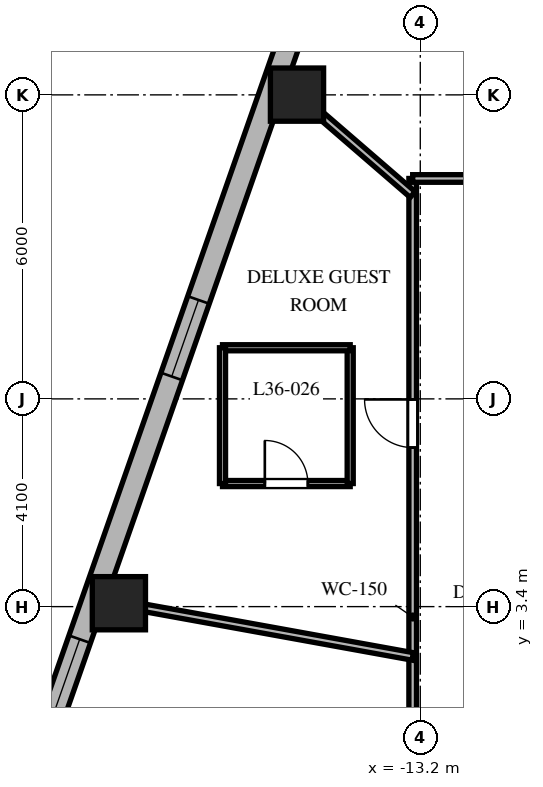
"""IFC4 building model, lengths in metres.
Left out: names, types, materials, properties, quantities, classifications, styles, units other than length and angle.
Written with IfcOpenShell. Run it as: python <this file> out.ifc"""

import sys

from ifc_helpers import new_model, si_unit, direction, frame, frame_2d, origin, origin_2d, place, context, subcontext, project, spatial, rectangle, extrude, element, fill, save


model = new_model("IFC4")
c1 = context("Model", 3, precision=1e-05, world=origin(), true_north=direction((0.0, 1.0)))
c2 = subcontext(c1, "Body", "Model", "MODEL_VIEW")
j1 = project(units=[si_unit("LENGTHUNIT", "METRE"), si_unit("PLANEANGLEUNIT", "RADIAN")], contexts=[c1])
p1 = place(None, origin())
s1 = spatial("IfcSite", under=j1, at=p1, CompositionType="ELEMENT")
p2 = place(p1, origin())
s2 = spatial("IfcBuilding", under=s1, at=p2, CompositionType="ELEMENT")
p3 = place(p2, frame((0.0, 0.0, 148.0)))
s3 = spatial("IfcBuildingStorey", under=s2, at=p3, CompositionType="ELEMENT", Elevation=148.0)
for number, where, z_axis, x_axis in (
    (1, (-15.633, 13.505, 0.0), (0.0, 0.0, 1.0), (1.0, 0.0, 0.0)),
    (2, (-19.148, 3.467, 0.0), (0.0, 0.0, 1.0), (1.0, 0.0, 0.0)),
):
    element("IfcColumn", number, at=place(p3, frame(where, z_axis=z_axis, x_axis=x_axis)), inside=s3, PredefinedType="COLUMN", context=c2, shape_type="SweptSolid", body=[
        extrude(rectangle(XDim=1.05, YDim=1.05, at=origin_2d()), origin(), (0.0, 0.0, 1.0), 3.7),
    ])
p4 = place(p3, frame((-14.937, 16.993, 0.0), z_axis=(0.0, 0.0, 1.0), x_axis=(-0.330431575061, -0.943829949834, 0.0)))
e3 = element("IfcWall", 3, at=p4, inside=s3, PredefinedType="SOLIDWALL", context=c2, shape_type="SweptSolid", body=[
    extrude(rectangle(XDim=17.689, YDim=0.45, at=frame_2d((8.844, 0.0))), origin(), (0.0, 0.0, 1.0), 3.4),
])
p5 = place(p4, frame((0.95, 0.0, 0.8)))
e4 = element("IfcOpeningElement", 4, at=p5, cuts=e3, PredefinedType="OPENING", context=c2, shape_type="SweptSolid", body=[
    extrude(rectangle(XDim=1.6, YDim=1.75, at=frame_2d((0.8, 0.875))), frame((0.0, 0.235, 0.0), z_axis=(0.0, -1.0, 0.0), x_axis=(1.0, 0.0, 0.0)), (0.0, 0.0, 1.0), 0.47),
])
p6 = place(p4, frame((7.99, 0.0, 0.8)))
e5 = element("IfcOpeningElement", 5, at=p6, cuts=e3, PredefinedType="OPENING", context=c2, shape_type="SweptSolid", body=[
    extrude(rectangle(XDim=1.6, YDim=1.75, at=frame_2d((0.8, 0.875))), frame((0.0, 0.235, 0.0), z_axis=(0.0, -1.0, 0.0), x_axis=(1.0, 0.0, 0.0)), (0.0, 0.0, 1.0), 0.47),
])
p7 = place(p4, frame((15.084, 0.0, 0.8)))
e6 = element("IfcOpeningElement", 6, at=p7, cuts=e3, PredefinedType="OPENING", context=c2, shape_type="SweptSolid", body=[
    extrude(rectangle(XDim=1.6, YDim=1.75, at=frame_2d((0.8, 0.875))), frame((0.0, 0.235, 0.0), z_axis=(0.0, -1.0, 0.0), x_axis=(1.0, 0.0, 0.0)), (0.0, 0.0, 1.0), 0.47),
])
p8 = place(p3, frame((-13.35, -11.85, 0.0), z_axis=(0.0, 0.0, 1.0), x_axis=(0.0, 1.0, 0.0)))
e7 = element("IfcWall", 7, at=p8, inside=s3, PredefinedType="PARTITIONING", context=c2, shape_type="SweptSolid", body=[
    extrude(rectangle(XDim=23.7, YDim=0.15, at=frame_2d((11.85, 0.0))), origin(), (0.0, 0.0, 1.0), 2.84),
])
p9 = place(p8, frame((18.389, 0.0, 0.0)))
e8 = element("IfcOpeningElement", 8, at=p9, cuts=e7, PredefinedType="OPENING", context=c2, shape_type="SweptSolid", body=[
    extrude(rectangle(XDim=0.95, YDim=2.03, at=frame_2d((0.475, 1.015))), frame((0.0, 0.085, 0.0), z_axis=(0.0, -1.0, 0.0), x_axis=(1.0, 0.0, 0.0)), (0.0, 0.0, 1.0), 0.17),
])
p10 = place(p8, frame((10.751, 0.0, 0.0)))
e9 = element("IfcOpeningElement", 9, at=p10, cuts=e7, PredefinedType="OPENING", context=c2, shape_type="SweptSolid", body=[
    extrude(rectangle(XDim=0.95, YDim=2.03, at=frame_2d((0.475, 1.015))), frame((0.0, 0.085, 0.0), z_axis=(0.0, -1.0, 0.0), x_axis=(1.0, 0.0, 0.0)), (0.0, 0.0, 1.0), 0.17),
])
p11 = place(p8, frame((5.951, 0.0, 0.0)))
e10 = element("IfcOpeningElement", 10, at=p11, cuts=e7, PredefinedType="OPENING", context=c2, shape_type="SweptSolid", body=[
    extrude(rectangle(XDim=0.9, YDim=2.03, at=frame_2d((0.45, 1.015))), frame((0.0, 0.085, 0.0), z_axis=(0.0, -1.0, 0.0), x_axis=(1.0, 0.0, 0.0)), (0.0, 0.0, 1.0), 0.17),
])
p12 = place(p8, frame((1.993, 0.0, 0.0)))
e11 = element("IfcOpeningElement", 11, at=p12, cuts=e7, PredefinedType="OPENING", context=c2, shape_type="SweptSolid", body=[
    extrude(rectangle(XDim=0.9, YDim=2.03, at=frame_2d((0.45, 1.015))), frame((0.0, 0.085, 0.0), z_axis=(0.0, -1.0, 0.0), x_axis=(1.0, 0.0, 0.0)), (0.0, 0.0, 1.0), 0.17),
])
p13 = place(p3, frame((-13.35, 11.85, 0.0), z_axis=(0.0, 0.0, 1.0), x_axis=(1.0, 0.0, 0.0)))
e12 = element("IfcWall", 12, at=p13, inside=s3, PredefinedType="PARTITIONING", context=c2, shape_type="SweptSolid", body=[
    extrude(rectangle(XDim=26.7, YDim=0.15, at=frame_2d((13.35, 0.0))), origin(), (0.0, 0.0, 1.0), 2.84),
])
p14 = place(p13, frame((20.682, 0.0, 0.0)))
e13 = element("IfcOpeningElement", 13, at=p14, cuts=e12, PredefinedType="OPENING", context=c2, shape_type="SweptSolid", body=[
    extrude(rectangle(XDim=0.95, YDim=2.03, at=frame_2d((0.475, 1.015))), frame((0.0, 0.085, 0.0), z_axis=(0.0, -1.0, 0.0), x_axis=(1.0, 0.0, 0.0)), (0.0, 0.0, 1.0), 0.17),
])
p15 = place(p13, frame((14.229, 0.0, 0.0)))
e14 = element("IfcOpeningElement", 14, at=p15, cuts=e12, PredefinedType="OPENING", context=c2, shape_type="SweptSolid", body=[
    extrude(rectangle(XDim=0.95, YDim=2.03, at=frame_2d((0.475, 1.015))), frame((0.0, 0.085, 0.0), z_axis=(0.0, -1.0, 0.0), x_axis=(1.0, 0.0, 0.0)), (0.0, 0.0, 1.0), 0.17),
])
p16 = place(p13, frame((10.075, 0.0, 0.0)))
e15 = element("IfcOpeningElement", 15, at=p16, cuts=e12, PredefinedType="OPENING", context=c2, shape_type="SweptSolid", body=[
    extrude(rectangle(XDim=0.95, YDim=2.03, at=frame_2d((0.475, 1.015))), frame((0.0, 0.085, 0.0), z_axis=(0.0, -1.0, 0.0), x_axis=(1.0, 0.0, 0.0)), (0.0, 0.0, 1.0), 0.17),
])
p17 = place(p13, frame((3.995, 0.0, 0.0)))
e16 = element("IfcOpeningElement", 16, at=p17, cuts=e12, PredefinedType="OPENING", context=c2, shape_type="SweptSolid", body=[
    extrude(rectangle(XDim=0.95, YDim=2.03, at=frame_2d((0.475, 1.015))), frame((0.0, 0.085, 0.0), z_axis=(0.0, -1.0, 0.0), x_axis=(1.0, 0.0, 0.0)), (0.0, 0.0, 1.0), 0.17),
])
p18 = place(p3, frame((-13.35, 11.533, 0.0), z_axis=(0.0, 0.0, 1.0), x_axis=(-0.756711647314, 0.65374879183, 0.0)))
e17 = element("IfcWall", 17, at=p18, inside=s3, PredefinedType="PARTITIONING", context=c2, shape_type="SweptSolid", body=[
    extrude(rectangle(XDim=3.55, YDim=0.15, at=frame_2d((1.775, 0.0))), origin(), (0.0, 0.0, 1.0), 2.64),
])
p19 = place(p3, frame((-13.35, 2.417, 0.0), z_axis=(0.0, 0.0, 1.0), x_axis=(-0.98399796473, 0.178179699761, 0.0)))
e18 = element("IfcWall", 18, at=p19, inside=s3, PredefinedType="PARTITIONING", context=c2, shape_type="SweptSolid", body=[
    extrude(rectangle(XDim=6.393, YDim=0.15, at=frame_2d((3.197, 0.0))), origin(), (0.0, 0.0, 1.0), 2.64),
])
p20 = place(p3, frame((-17.103, 5.829, 0.0), z_axis=(0.0, 0.0, 1.0), x_axis=(1.0, 0.0, 0.0)))
e19 = element("IfcWall", 19, at=p20, inside=s3, PredefinedType="PARTITIONING", context=c2, shape_type="SweptSolid", body=[
    extrude(rectangle(XDim=2.52, YDim=0.12, at=frame_2d((1.26, 0.0))), origin(), (0.0, 0.0, 1.0), 2.972),
])
p21 = place(p20, frame((0.835, 0.0, 0.0)))
e20 = element("IfcOpeningElement", 20, at=p21, cuts=e19, PredefinedType="OPENING", context=c2, shape_type="SweptSolid", body=[
    extrude(rectangle(XDim=0.85, YDim=2.03, at=frame_2d((0.425, 1.015))), frame((0.0, 0.07, 0.0), z_axis=(0.0, -1.0, 0.0), x_axis=(1.0, 0.0, 0.0)), (0.0, 0.0, 1.0), 0.14),
])
p22 = place(p3, frame((-14.583, 5.829, 0.0), z_axis=(0.0, 0.0, 1.0), x_axis=(0.0, 1.0, 0.0)))
e21 = element("IfcWall", 21, at=p22, inside=s3, PredefinedType="PARTITIONING", context=c2, shape_type="SweptSolid", body=[
    extrude(rectangle(XDim=2.68, YDim=0.12, at=frame_2d((1.34, 0.0))), origin(), (0.0, 0.0, 1.0), 2.972),
])
p23 = place(p3, frame((-14.583, 8.509, 0.0), z_axis=(0.0, 0.0, 1.0), x_axis=(-1.0, 0.0, 0.0)))
e22 = element("IfcWall", 22, at=p23, inside=s3, PredefinedType="PARTITIONING", context=c2, shape_type="SweptSolid", body=[
    extrude(rectangle(XDim=2.52, YDim=0.12, at=frame_2d((1.26, 0.0))), origin(), (0.0, 0.0, 1.0), 2.972),
])
p24 = place(p3, frame((-17.103, 8.509, 0.0), z_axis=(0.0, 0.0, 1.0), x_axis=(0.0, -1.0, 0.0)))
e23 = element("IfcWall", 23, at=p24, inside=s3, PredefinedType="PARTITIONING", context=c2, shape_type="SweptSolid", body=[
    extrude(rectangle(XDim=2.68, YDim=0.12, at=frame_2d((1.34, 0.0))), origin(), (0.0, 0.0, 1.0), 2.64),
])
p25 = place(p6, origin())
e24 = element("IfcWindow", 24, at=p25, inside=s3, PartitioningType="SINGLE_PANEL", PredefinedType="WINDOW", context=c2, shape_type="SweptSolid", body=[
    extrude(rectangle(XDim=1.6, YDim=1.75, at=frame_2d((0.8, 0.875))), frame((0.0, 0.03, 0.0), z_axis=(0.0, -1.0, 0.0), x_axis=(1.0, 0.0, 0.0)), (0.0, 0.0, 1.0), 0.06),
])
fill(e5, e24)
p26 = place(p7, origin())
e25 = element("IfcWindow", 25, at=p26, inside=s3, PartitioningType="SINGLE_PANEL", PredefinedType="WINDOW", context=c2, shape_type="SweptSolid", body=[
    extrude(rectangle(XDim=1.6, YDim=1.75, at=frame_2d((0.8, 0.875))), frame((0.0, 0.03, 0.0), z_axis=(0.0, -1.0, 0.0), x_axis=(1.0, 0.0, 0.0)), (0.0, 0.0, 1.0), 0.06),
])
fill(e6, e25)
p27 = place(p9, origin())
e26 = element("IfcDoor", 26, at=p27, inside=s3, OperationType="SINGLE_SWING_RIGHT", PredefinedType="DOOR", context=c2, shape_type="SweptSolid", body=[
    extrude(rectangle(XDim=0.95, YDim=2.03, at=frame_2d((0.475, 1.015))), frame((0.0, 0.025, 0.0), z_axis=(0.0, -1.0, 0.0), x_axis=(1.0, 0.0, 0.0)), (0.0, 0.0, 1.0), 0.05),
])
fill(e8, e26)
p28 = place(p21, origin())
e27 = element("IfcDoor", 27, at=p28, inside=s3, OperationType="SINGLE_SWING_LEFT", PredefinedType="DOOR", context=c2, shape_type="SweptSolid", body=[
    extrude(rectangle(XDim=0.85, YDim=2.03, at=frame_2d((0.425, 1.015))), frame((0.0, 0.025, 0.0), z_axis=(0.0, -1.0, 0.0), x_axis=(1.0, 0.0, 0.0)), (0.0, 0.0, 1.0), 0.05),
])
fill(e20, e27)
save(model, sys.argv[1])
